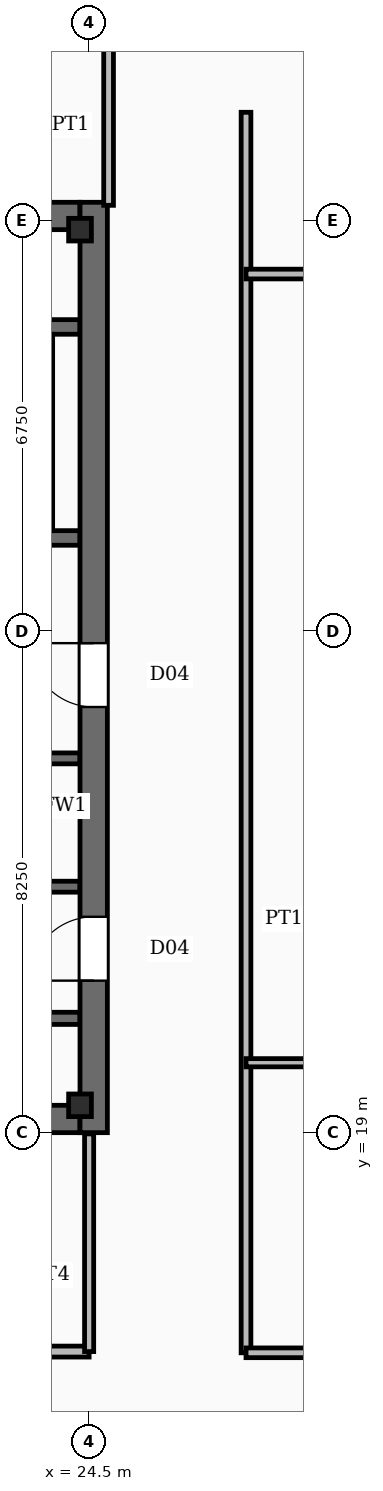
"""IFC4 building model, lengths in metres.
Left out: names, types, materials, properties, quantities, classifications, styles, units other than length and angle.
Written with IfcOpenShell. Run it as: python <this file> out.ifc"""

import sys

from ifc_helpers import new_model, si_unit, direction, frame, frame_2d, origin, origin_2d, place, context, subcontext, project, spatial, rectangle, i_section, extrude, element, fill, save


model = new_model("IFC4")
c1 = context("Model", 3, precision=1e-05, world=origin(), true_north=direction((0.0, 1.0)))
c2 = subcontext(c1, "Body", "Model", "MODEL_VIEW")
j1 = project(units=[si_unit("LENGTHUNIT", "METRE"), si_unit("PLANEANGLEUNIT", "RADIAN")], contexts=[c1])
p1 = place(None, origin())
s1 = spatial("IfcSite", under=j1, at=p1, CompositionType="ELEMENT")
p2 = place(p1, origin())
s2 = spatial("IfcBuilding", under=s1, at=p2, CompositionType="ELEMENT")
p3 = place(p2, frame((0.0, 0.0, 317.2)))
s3 = spatial("IfcBuildingStorey", under=s2, at=p3, CompositionType="ELEMENT", Elevation=317.2)
p4 = place(p3, frame((24.575, 19.0, -0.24), z_axis=(0.0, 0.0, 1.0), x_axis=(0.0, 1.0, 0.0)))
e1 = element("IfcWall", 1, at=p4, inside=s3, PredefinedType="SHEAR", context=c2, shape_type="SweptSolid", body=[
    extrude(rectangle(XDim=15.3, YDim=0.45, at=frame_2d((7.65, 0.0))), origin(), (0.0, 0.0, 1.0), 4.62),
])
p5 = place(p4, frame((2.5, 0.0, 0.24)))
e2 = element("IfcOpeningElement", 2, at=p5, cuts=e1, PredefinedType="OPENING", context=c2, shape_type="SweptSolid", body=[
    extrude(rectangle(XDim=1.05, YDim=2.15, at=frame_2d((0.525, 1.075))), frame((0.0, 0.235, 0.0), z_axis=(0.0, -1.0, 0.0), x_axis=(1.0, 0.0, 0.0)), (0.0, 0.0, 1.0), 0.47),
])
p6 = place(p4, frame((7.0, 0.0, 0.24)))
e3 = element("IfcOpeningElement", 3, at=p6, cuts=e1, PredefinedType="OPENING", context=c2, shape_type="SweptSolid", body=[
    extrude(rectangle(XDim=1.05, YDim=2.15, at=frame_2d((0.525, 1.075))), frame((0.0, 0.235, 0.0), z_axis=(0.0, -1.0, 0.0), x_axis=(1.0, 0.0, 0.0)), (0.0, 0.0, 1.0), 0.47),
])
for number, where, z_axis, x_axis in (
    (4, (14.55, 19.225, -0.24), (0.0, 0.0, 1.0), (1.0, 0.0, 0.0)),
    (5, (14.55, 34.075, -0.24), (0.0, 0.0, 1.0), (1.0, 0.0, 0.0)),
):
    element("IfcWall", number, at=place(p3, frame(where, z_axis=z_axis, x_axis=x_axis)), inside=s3, PredefinedType="SHEAR", context=c2, shape_type="SweptSolid", body=[
        extrude(rectangle(XDim=9.8, YDim=0.45, at=frame_2d((4.9, 0.0))), origin(), (0.0, 0.0, 1.0), 4.62),
    ])
for number, where, z_axis, x_axis in (
    (6, (24.35, 19.45, -0.24), (0.0, 0.0, 1.0), (1.0, 0.0, 0.0)),
    (7, (24.35, 33.85, -0.24), (0.0, 0.0, 1.0), (1.0, 0.0, 0.0)),
):
    element("IfcColumn", number, at=place(p3, frame(where, z_axis=z_axis, x_axis=x_axis)), inside=s3, PredefinedType="COLUMN", context=c2, shape_type="SweptSolid", body=[
        extrude(i_section(OverallWidth=0.374, OverallDepth=0.372, WebThickness=0.016, FlangeThickness=0.026, FilletRadius=0.02, at=origin_2d()), origin(), (0.0, 0.0, 1.0), 4.62),
    ])
p7 = place(p3, frame((24.35, 28.78, 0.0), z_axis=(0.0, 0.0, 1.0), x_axis=(-1.0, 0.0, 0.0)))
e8 = element("IfcWall", 8, at=p7, inside=s3, PredefinedType="SOLIDWALL", context=c2, shape_type="SweptSolid", body=[
    extrude(rectangle(XDim=9.8, YDim=0.24, at=frame_2d((4.9, 0.0))), origin(), (0.0, 0.0, 1.0), 4.38),
])
p8 = place(p7, frame((7.83, 0.0, 0.0)))
e9 = element("IfcOpeningElement", 9, at=p8, cuts=e8, PredefinedType="OPENING", context=c2, shape_type="SweptSolid", body=[
    extrude(rectangle(XDim=1.1, YDim=2.15, at=frame_2d((0.55, 1.075))), frame((0.0, 0.13, 0.0), z_axis=(0.0, -1.0, 0.0), x_axis=(1.0, 0.0, 0.0)), (0.0, 0.0, 1.0), 0.26),
])
p9 = place(p3, frame((14.55, 32.25, 0.0), z_axis=(0.0, 0.0, 1.0), x_axis=(1.0, 0.0, 0.0)))
e10 = element("IfcWall", 10, at=p9, inside=s3, PredefinedType="SOLIDWALL", context=c2, shape_type="SweptSolid", body=[
    extrude(rectangle(XDim=9.8, YDim=0.24, at=frame_2d((4.9, 0.0))), origin(), (0.0, 0.0, 1.0), 4.38),
])
p10 = place(p3, frame((23.78, 28.9, 0.0), z_axis=(0.0, 0.0, 1.0), x_axis=(0.0, 1.0, 0.0)))
e11 = element("IfcWall", 11, at=p10, inside=s3, PredefinedType="SOLIDWALL", context=c2, shape_type="SweptSolid", body=[
    extrude(rectangle(XDim=3.23, YDim=0.24, at=frame_2d((1.615, 0.0))), origin(), (0.0, 0.0, 1.0), 4.38),
])
p11 = place(p3, frame((20.95, 25.155, 0.0), z_axis=(0.0, 0.0, 1.0), x_axis=(1.0, 0.0, 0.0)))
e12 = element("IfcWall", 12, at=p11, inside=s3, PredefinedType="SOLIDWALL", context=c2, shape_type="SweptSolid", body=[
    extrude(rectangle(XDim=3.4, YDim=0.18, at=frame_2d((1.7, 0.0))), origin(), (0.0, 0.0, 1.0), 4.38),
])
p12 = place(p3, frame((20.95, 23.045, 0.0), z_axis=(0.0, 0.0, 1.0), x_axis=(1.0, 0.0, 0.0)))
e13 = element("IfcWall", 13, at=p12, inside=s3, PredefinedType="SOLIDWALL", context=c2, shape_type="SweptSolid", body=[
    extrude(rectangle(XDim=3.4, YDim=0.18, at=frame_2d((1.7, 0.0))), origin(), (0.0, 0.0, 1.0), 4.38),
])
p13 = place(p12, frame((0.75, 0.0, 0.0)))
e14 = element("IfcOpeningElement", 14, at=p13, cuts=e13, PredefinedType="OPENING", context=c2, shape_type="SweptSolid", body=[
    extrude(rectangle(XDim=1.2, YDim=2.2, at=frame_2d((0.6, 1.1))), frame((0.0, 0.1, 0.0), z_axis=(0.0, -1.0, 0.0), x_axis=(1.0, 0.0, 0.0)), (0.0, 0.0, 1.0), 0.2),
])
p14 = place(p3, frame((14.55, 20.88, 0.0), z_axis=(0.0, 0.0, 1.0), x_axis=(1.0, 0.0, 0.0)))
e15 = element("IfcWall", 15, at=p14, inside=s3, PredefinedType="SOLIDWALL", context=c2, shape_type="SweptSolid", body=[
    extrude(rectangle(XDim=9.8, YDim=0.2, at=frame_2d((4.9, 0.0))), origin(), (0.0, 0.0, 1.0), 3.44),
])
p15 = place(p14, frame((3.4, 0.0, 0.0)))
e16 = element("IfcOpeningElement", 16, at=p15, cuts=e15, PredefinedType="OPENING", context=c2, shape_type="SweptSolid", body=[
    extrude(rectangle(XDim=1.05, YDim=2.15, at=frame_2d((0.525, 1.075))), frame((0.0, 0.11, 0.0), z_axis=(0.0, -1.0, 0.0), x_axis=(1.0, 0.0, 0.0)), (0.0, 0.0, 1.0), 0.22),
])
p16 = place(p3, frame((14.6, 15.4, 0.0), z_axis=(0.0, 0.0, 1.0), x_axis=(1.0, 0.0, 0.0)))
e17 = element("IfcWall", 17, at=p16, inside=s3, PredefinedType="PARTITIONING", context=c2, shape_type="SweptSolid", body=[
    extrude(rectangle(XDim=9.9, YDim=0.18, at=frame_2d((4.95, 0.0))), origin(), (0.0, 0.0, 1.0), 3.44),
])
p17 = place(p16, frame((0.74, 0.0, 0.0)))
e18 = element("IfcOpeningElement", 18, at=p17, cuts=e17, PredefinedType="OPENING", context=c2, shape_type="SweptSolid", body=[
    extrude(rectangle(XDim=0.92, YDim=2.1, at=frame_2d((0.46, 1.05))), frame((0.0, 0.1, 0.0), z_axis=(0.0, -1.0, 0.0), x_axis=(1.0, 0.0, 0.0)), (0.0, 0.0, 1.0), 0.2),
])
p18 = place(p16, frame((3.19, 0.0, 0.0)))
e19 = element("IfcOpeningElement", 19, at=p18, cuts=e17, PredefinedType="OPENING", context=c2, shape_type="SweptSolid", body=[
    extrude(rectangle(XDim=0.92, YDim=2.1, at=frame_2d((0.46, 1.05))), frame((0.0, 0.1, 0.0), z_axis=(0.0, -1.0, 0.0), x_axis=(1.0, 0.0, 0.0)), (0.0, 0.0, 1.0), 0.2),
])
p19 = place(p16, frame((5.69, 0.0, 0.0)))
e20 = element("IfcOpeningElement", 20, at=p19, cuts=e17, PredefinedType="OPENING", context=c2, shape_type="SweptSolid", body=[
    extrude(rectangle(XDim=0.92, YDim=2.1, at=frame_2d((0.46, 1.05))), frame((0.0, 0.1, 0.0), z_axis=(0.0, -1.0, 0.0), x_axis=(1.0, 0.0, 0.0)), (0.0, 0.0, 1.0), 0.2),
])
p20 = place(p16, frame((8.19, 0.0, 0.0)))
e21 = element("IfcOpeningElement", 21, at=p20, cuts=e17, PredefinedType="OPENING", context=c2, shape_type="SweptSolid", body=[
    extrude(rectangle(XDim=0.92, YDim=2.1, at=frame_2d((0.46, 1.05))), frame((0.0, 0.1, 0.0), z_axis=(0.0, -1.0, 0.0), x_axis=(1.0, 0.0, 0.0)), (0.0, 0.0, 1.0), 0.2),
])
p21 = place(p3, frame((24.5, 15.4, 0.0), z_axis=(0.0, 0.0, 1.0), x_axis=(0.0, 1.0, 0.0)))
e22 = element("IfcWall", 22, at=p21, inside=s3, PredefinedType="PARTITIONING", context=c2, shape_type="SweptSolid", body=[
    extrude(rectangle(XDim=3.58, YDim=0.15, at=frame_2d((1.79, 0.0))), origin(), (0.0, 0.0, 1.0), 3.44),
])
p22 = place(p3, frame((27.08, 20.15, 0.0), z_axis=(0.0, 0.0, 1.0), x_axis=(1.0, 0.0, 0.0)))
e23 = element("IfcWall", 23, at=p22, inside=s3, PredefinedType="PARTITIONING", context=c2, shape_type="SweptSolid", body=[
    extrude(rectangle(XDim=20.74, YDim=0.135, at=frame_2d((10.37, 0.0))), origin(), (0.0, 0.0, 1.0), 3.44),
])
p23 = place(p22, frame((1.6, 0.0, 0.0)))
e24 = element("IfcOpeningElement", 24, at=p23, cuts=e23, PredefinedType="OPENING", context=c2, shape_type="SweptSolid", body=[
    extrude(rectangle(XDim=1.6, YDim=2.15, at=frame_2d((0.8, 1.075))), frame((0.0, 0.077, 0.0), z_axis=(0.0, -1.0, 0.0), x_axis=(1.0, 0.0, 0.0)), (0.0, 0.0, 1.0), 0.155),
])
p24 = place(p22, frame((14.2, 0.0, 0.0)))
e25 = element("IfcOpeningElement", 25, at=p24, cuts=e23, PredefinedType="OPENING", context=c2, shape_type="SweptSolid", body=[
    extrude(rectangle(XDim=1.6, YDim=2.15, at=frame_2d((0.8, 1.075))), frame((0.0, 0.077, 0.0), z_axis=(0.0, -1.0, 0.0), x_axis=(1.0, 0.0, 0.0)), (0.0, 0.0, 1.0), 0.155),
])
p25 = place(p3, frame((27.08, 33.12, 0.0), z_axis=(0.0, 0.0, 1.0), x_axis=(1.0, 0.0, 0.0)))
e26 = element("IfcWall", 26, at=p25, inside=s3, PredefinedType="PARTITIONING", context=c2, shape_type="SweptSolid", body=[
    extrude(rectangle(XDim=20.74, YDim=0.16, at=frame_2d((10.37, 0.0))), origin(), (0.0, 0.0, 1.0), 3.44),
])
p26 = place(p3, frame((27.08, 15.38, 0.0), z_axis=(0.0, 0.0, 1.0), x_axis=(1.0, 0.0, 0.0)))
e27 = element("IfcWall", 27, at=p26, inside=s3, PredefinedType="PARTITIONING", context=c2, shape_type="SweptSolid", body=[
    extrude(rectangle(XDim=20.74, YDim=0.16, at=frame_2d((10.37, 0.0))), origin(), (0.0, 0.0, 1.0), 3.44),
])
p27 = place(p26, frame((9.5, 0.0, 0.0)))
e28 = element("IfcOpeningElement", 28, at=p27, cuts=e27, PredefinedType="OPENING", context=c2, shape_type="SweptSolid", body=[
    extrude(rectangle(XDim=1.6, YDim=2.15, at=frame_2d((0.8, 1.075))), frame((0.0, 0.09, 0.0), z_axis=(0.0, -1.0, 0.0), x_axis=(1.0, 0.0, 0.0)), (0.0, 0.0, 1.0), 0.18),
])
p28 = place(p3, frame((27.08, 15.38, 0.0), z_axis=(0.0, 0.0, 1.0), x_axis=(0.0, 1.0, 0.0)))
e29 = element("IfcWall", 29, at=p28, inside=s3, PredefinedType="PARTITIONING", context=c2, shape_type="SweptSolid", body=[
    extrude(rectangle(XDim=20.4, YDim=0.16, at=frame_2d((10.2, 0.0))), origin(), (0.0, 0.0, 1.0), 3.44),
])
p29 = place(p3, frame((24.82, 34.25, 0.0), z_axis=(0.0, 0.0, 1.0), x_axis=(0.0, 1.0, 0.0)))
e30 = element("IfcWall", 30, at=p29, inside=s3, PredefinedType="PARTITIONING", context=c2, shape_type="SweptSolid", body=[
    extrude(rectangle(XDim=3.77, YDim=0.16, at=frame_2d((1.885, 0.0))), origin(), (0.0, 0.0, 1.0), 3.44),
])
p30 = place(p5, origin())
e31 = element("IfcDoor", 31, at=p30, inside=s3, OperationType="SINGLE_SWING_LEFT", PredefinedType="DOOR", context=c2, shape_type="SweptSolid", body=[
    extrude(rectangle(XDim=1.05, YDim=2.15, at=frame_2d((0.525, 1.075))), frame((0.0, 0.025, 0.0), z_axis=(0.0, -1.0, 0.0), x_axis=(1.0, 0.0, 0.0)), (0.0, 0.0, 1.0), 0.05),
])
fill(e2, e31)
p31 = place(p6, origin())
e32 = element("IfcDoor", 32, at=p31, inside=s3, OperationType="SINGLE_SWING_RIGHT", PredefinedType="DOOR", context=c2, shape_type="SweptSolid", body=[
    extrude(rectangle(XDim=1.05, YDim=2.15, at=frame_2d((0.525, 1.075))), frame((0.0, 0.025, 0.0), z_axis=(0.0, -1.0, 0.0), x_axis=(1.0, 0.0, 0.0)), (0.0, 0.0, 1.0), 0.05),
])
fill(e3, e32)
save(model, sys.argv[1])
